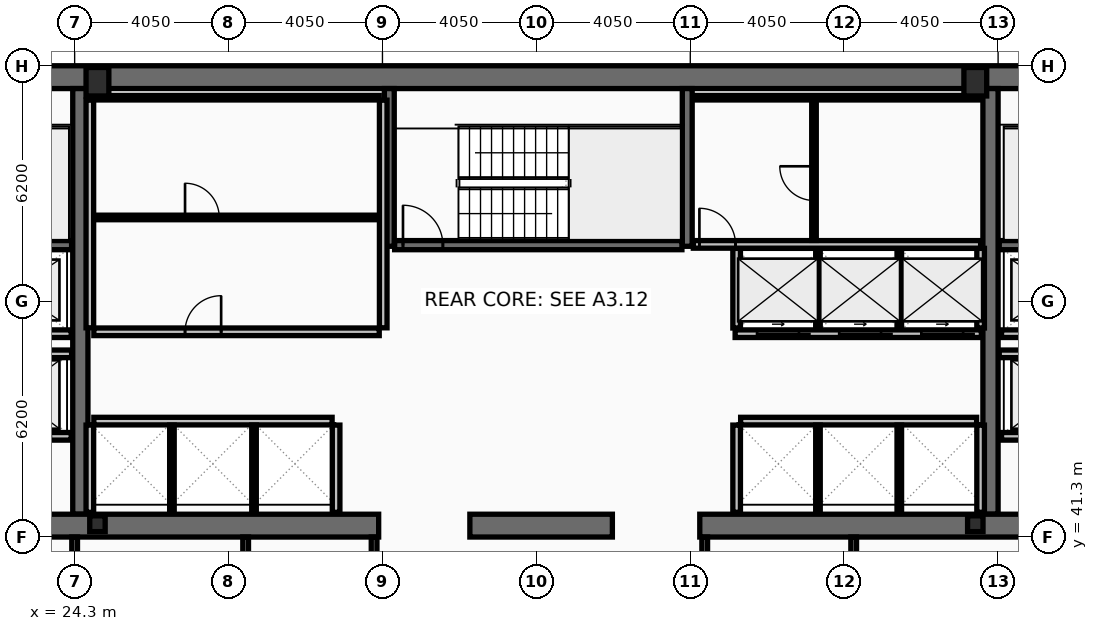
"""IFC4 building model, lengths in metres.
Left out: names, types, materials, properties, quantities, classifications, styles, units other than length and angle.
Written with IfcOpenShell. Run it as: python <this file> out.ifc"""

import sys

from ifc_helpers import new_model, si_unit, direction, frame, frame_2d, origin, origin_2d, place, context, subcontext, project, spatial, rectangle, hollow_rectangle, i_section, extrude, element, fill, save


model = new_model("IFC4")
c1 = context("Model", 3, precision=1e-05, world=origin(), true_north=direction((0.0, 1.0)))
c2 = subcontext(c1, "Body", "Model", "MODEL_VIEW")
j1 = project(units=[si_unit("LENGTHUNIT", "METRE"), si_unit("PLANEANGLEUNIT", "RADIAN")], contexts=[c1])
p1 = place(None, origin())
s1 = spatial("IfcSite", under=j1, at=p1, CompositionType="ELEMENT")
p2 = place(p1, origin())
s2 = spatial("IfcBuilding", under=s1, at=p2, CompositionType="ELEMENT")
p3 = place(p2, frame((0.0, 0.0, 188.6)))
s3 = spatial("IfcBuildingStorey", under=s2, at=p3, CompositionType="ELEMENT", Elevation=188.6)
p4 = place(p3, frame((16.2, 53.4, 0.0), z_axis=(0.0, 0.0, 1.0), x_axis=(1.0, 0.0, 0.0)))
e1 = element("IfcWall", 1, at=p4, inside=s3, PredefinedType="SHEAR", context=c2, shape_type="SweptSolid", body=[
    extrude(rectangle(XDim=40.5, YDim=0.6, at=frame_2d((20.25, 0.0))), origin(), (0.0, 0.0, 1.0), 3.44),
])
for number, where, z_axis, x_axis in (
    (2, (24.45, 41.9, 0.0), (0.0, 0.0, 1.0), (0.0, 1.0, 0.0)),
    (3, (48.4, 41.9, 0.0), (0.0, 0.0, 1.0), (0.0, 1.0, 0.0)),
):
    element("IfcWall", number, at=place(p3, frame(where, z_axis=z_axis, x_axis=x_axis)), inside=s3, PredefinedType="SHEAR", context=c2, shape_type="SweptSolid", body=[
        extrude(rectangle(XDim=11.2, YDim=0.4, at=frame_2d((5.6, 0.0))), origin(), (0.0, 0.0, 1.0), 3.44),
    ])
p5 = place(p3, frame((32.3, 41.6, 0.0), z_axis=(0.0, 0.0, 1.0), x_axis=(-1.0, 0.0, 0.0)))
e4 = element("IfcWall", 4, at=p5, inside=s3, PredefinedType="SHEAR", context=c2, shape_type="SweptSolid", body=[
    extrude(rectangle(XDim=11.45, YDim=0.6, at=frame_2d((5.725, 0.0))), origin(), (0.0, 0.0, 1.0), 3.44),
])
p6 = place(p3, frame((38.45, 41.6, 0.0), z_axis=(0.0, 0.0, 1.0), x_axis=(-1.0, 0.0, 0.0)))
e5 = element("IfcWall", 5, at=p6, inside=s3, PredefinedType="SHEAR", context=c2, shape_type="SweptSolid", body=[
    extrude(rectangle(XDim=3.75, YDim=0.6, at=frame_2d((1.875, 0.0))), origin(), (0.0, 0.0, 1.0), 3.44),
])
p7 = place(p3, frame((52.05, 41.6, 0.0), z_axis=(0.0, 0.0, 1.0), x_axis=(-1.0, 0.0, 0.0)))
e6 = element("IfcWall", 6, at=p7, inside=s3, PredefinedType="SHEAR", context=c2, shape_type="SweptSolid", body=[
    extrude(rectangle(XDim=11.3, YDim=0.6, at=frame_2d((5.65, 0.0))), origin(), (0.0, 0.0, 1.0), 3.44),
])
for number, where, z_axis, x_axis in (
    (7, (32.58, 48.95, 0.0), (0.0, 0.0, 1.0), (0.0, 1.0, 0.0)),
    (8, (40.42, 48.95, 0.0), (0.0, 0.0, 1.0), (0.0, 1.0, 0.0)),
):
    element("IfcWall", number, at=place(p3, frame(where, z_axis=z_axis, x_axis=x_axis)), inside=s3, PredefinedType="SHEAR", context=c2, shape_type="SweptSolid", body=[
        extrude(rectangle(XDim=4.15, YDim=0.26, at=frame_2d((2.075, 0.0))), origin(), (0.0, 0.0, 1.0), 3.44),
    ])
p8 = place(p3, frame((16.8, 48.98, 0.0), z_axis=(0.0, 0.0, 1.0), x_axis=(1.0, 0.0, 0.0)))
e9 = element("IfcWall", 9, at=p8, inside=s3, PredefinedType="SHEAR", context=c2, shape_type="SweptSolid", body=[
    extrude(rectangle(XDim=7.42, YDim=0.24, at=frame_2d((3.71, 0.0))), origin(), (0.0, 0.0, 1.0), 3.44),
])
p9 = place(p8, frame((0.22, 0.0, 0.0)))
e10 = element("IfcOpeningElement", 10, at=p9, cuts=e9, PredefinedType="OPENING", context=c2, shape_type="SweptSolid", body=[
    extrude(rectangle(XDim=1.05, YDim=2.15, at=frame_2d((0.525, 1.075))), frame((0.0, 0.13, 0.0), z_axis=(0.0, -1.0, 0.0), x_axis=(1.0, 0.0, 0.0)), (0.0, 0.0, 1.0), 0.26),
])
p10 = place(p3, frame((48.63, 48.98, 0.0), z_axis=(0.0, 0.0, 1.0), x_axis=(1.0, 0.0, 0.0)))
e11 = element("IfcWall", 11, at=p10, inside=s3, PredefinedType="SHEAR", context=c2, shape_type="SweptSolid", body=[
    extrude(rectangle(XDim=7.47, YDim=0.24, at=frame_2d((3.735, 0.0))), origin(), (0.0, 0.0, 1.0), 3.44),
])
p11 = place(p10, frame((6.2, 0.0, 0.0)))
e12 = element("IfcOpeningElement", 12, at=p11, cuts=e11, PredefinedType="OPENING", context=c2, shape_type="SweptSolid", body=[
    extrude(rectangle(XDim=1.05, YDim=2.15, at=frame_2d((0.525, 1.075))), frame((0.0, 0.13, 0.0), z_axis=(0.0, -1.0, 0.0), x_axis=(1.0, 0.0, 0.0)), (0.0, 0.0, 1.0), 0.26),
])
p12 = place(p3, frame((32.72, 48.98, 0.0), z_axis=(0.0, 0.0, 1.0), x_axis=(1.0, 0.0, 0.0)))
e13 = element("IfcWall", 13, at=p12, inside=s3, PredefinedType="SHEAR", context=c2, shape_type="SweptSolid", body=[
    extrude(rectangle(XDim=7.56, YDim=0.24, at=frame_2d((3.78, 0.0))), origin(), (0.0, 0.0, 1.0), 3.44),
])
p13 = place(p12, frame((0.22, 0.0, 0.0)))
e14 = element("IfcOpeningElement", 14, at=p13, cuts=e13, PredefinedType="OPENING", context=c2, shape_type="SweptSolid", body=[
    extrude(rectangle(XDim=1.05, YDim=2.15, at=frame_2d((0.525, 1.075))), frame((0.0, 0.13, 0.0), z_axis=(0.0, -1.0, 0.0), x_axis=(1.0, 0.0, 0.0)), (0.0, 0.0, 1.0), 0.26),
])
for number, where, z_axis, x_axis in (
    (15, (24.9, 53.28, 0.0), (0.0, 0.0, 1.0), (1.0, 0.0, 0.0)),
    (16, (48.0, 53.28, 0.0), (0.0, 0.0, 1.0), (1.0, 0.0, 0.0)),
):
    element("IfcColumn", number, at=place(p3, frame(where, z_axis=z_axis, x_axis=x_axis)), inside=s3, PredefinedType="COLUMN", context=c2, shape_type="SweptSolid", body=[
        extrude(hollow_rectangle(XDim=0.6, YDim=0.75, WallThickness=0.045, at=origin_2d()), origin(), (0.0, 0.0, 1.0), 3.6),
    ])
for number, where, z_axis, x_axis in (
    (17, (24.9, 41.65, 0.0), (0.0, 0.0, 1.0), (1.0, 0.0, 0.0)),
    (18, (48.0, 41.65, 0.0), (0.0, 0.0, 1.0), (1.0, 0.0, 0.0)),
):
    element("IfcColumn", number, at=place(p3, frame(where, z_axis=z_axis, x_axis=x_axis)), inside=s3, PredefinedType="COLUMN", context=c2, shape_type="SweptSolid", body=[
        extrude(i_section(OverallWidth=0.406, OverallDepth=0.416, WebThickness=0.03, FlangeThickness=0.048, at=origin_2d()), origin(), (0.0, 0.0, 1.0), 3.6),
    ])
p14 = place(p3, frame((51.61, 43.95, 0.0), z_axis=(0.0, 0.0, 1.0), x_axis=(-1.0, 0.0, 0.0)))
e19 = element("IfcWall", 19, at=p14, inside=s3, PredefinedType="PARTITIONING", context=c2, shape_type="SweptSolid", body=[
    extrude(rectangle(XDim=2.92, YDim=0.2, at=frame_2d((1.46, 0.0))), origin(), (0.0, 0.0, 1.0), 3.44),
])
p15 = place(p14, frame((0.81, 0.0, 0.0)))
e20 = element("IfcOpeningElement", 20, at=p15, cuts=e19, PredefinedType="OPENING", context=c2, shape_type="SweptSolid", body=[
    extrude(rectangle(XDim=1.3, YDim=2.18, at=frame_2d((0.65, 1.09))), frame((0.0, 0.11, 0.0), z_axis=(0.0, -1.0, 0.0), x_axis=(1.0, 0.0, 0.0)), (0.0, 0.0, 1.0), 0.22),
])
p16 = place(p3, frame((24.21, 43.95, 0.0), z_axis=(0.0, 0.0, 1.0), x_axis=(-1.0, 0.0, 0.0)))
e21 = element("IfcWall", 21, at=p16, inside=s3, PredefinedType="PARTITIONING", context=c2, shape_type="SweptSolid", body=[
    extrude(rectangle(XDim=2.97, YDim=0.2, at=frame_2d((1.485, 0.0))), origin(), (0.0, 0.0, 1.0), 3.44),
])
p17 = place(p16, frame((0.86, 0.0, 0.0)))
e22 = element("IfcOpeningElement", 22, at=p17, cuts=e21, PredefinedType="OPENING", context=c2, shape_type="SweptSolid", body=[
    extrude(rectangle(XDim=1.3, YDim=2.18, at=frame_2d((0.65, 1.09))), frame((0.0, 0.11, 0.0), z_axis=(0.0, -1.0, 0.0), x_axis=(1.0, 0.0, 0.0)), (0.0, 0.0, 1.0), 0.22),
])
p18 = place(p3, frame((51.61, 46.65, 0.0), z_axis=(0.0, 0.0, 1.0), x_axis=(-1.0, 0.0, 0.0)))
e23 = element("IfcWall", 23, at=p18, inside=s3, PredefinedType="PARTITIONING", context=c2, shape_type="SweptSolid", body=[
    extrude(rectangle(XDim=2.92, YDim=0.2, at=frame_2d((1.46, 0.0))), origin(), (0.0, 0.0, 1.0), 3.44),
])
p19 = place(p18, frame((0.86, 0.0, 0.0)))
e24 = element("IfcOpeningElement", 24, at=p19, cuts=e23, PredefinedType="OPENING", context=c2, shape_type="SweptSolid", body=[
    extrude(rectangle(XDim=1.2, YDim=2.18, at=frame_2d((0.6, 1.09))), frame((0.0, 0.11, 0.0), z_axis=(0.0, -1.0, 0.0), x_axis=(1.0, 0.0, 0.0)), (0.0, 0.0, 1.0), 0.22),
])
p20 = place(p3, frame((24.21, 46.65, 0.0), z_axis=(0.0, 0.0, 1.0), x_axis=(-1.0, 0.0, 0.0)))
e25 = element("IfcWall", 25, at=p20, inside=s3, PredefinedType="PARTITIONING", context=c2, shape_type="SweptSolid", body=[
    extrude(rectangle(XDim=2.97, YDim=0.2, at=frame_2d((1.485, 0.0))), origin(), (0.0, 0.0, 1.0), 3.44),
])
p21 = place(p20, frame((0.91, 0.0, 0.0)))
e26 = element("IfcOpeningElement", 26, at=p21, cuts=e25, PredefinedType="OPENING", context=c2, shape_type="SweptSolid", body=[
    extrude(rectangle(XDim=1.2, YDim=2.18, at=frame_2d((0.6, 1.09))), frame((0.0, 0.11, 0.0), z_axis=(0.0, -1.0, 0.0), x_axis=(1.0, 0.0, 0.0)), (0.0, 0.0, 1.0), 0.22),
])
p22 = place(p3, frame((48.16, 46.65, 0.0), z_axis=(0.0, 0.0, 1.0), x_axis=(-1.0, 0.0, 0.0)))
e27 = element("IfcWall", 27, at=p22, inside=s3, PredefinedType="PARTITIONING", context=c2, shape_type="SweptSolid", body=[
    extrude(rectangle(XDim=6.48, YDim=0.2, at=frame_2d((3.24, 0.0))), origin(), (0.0, 0.0, 1.0), 3.44),
])
p23 = place(p22, frame((4.8, 0.0, 0.0)))
e28 = element("IfcOpeningElement", 28, at=p23, cuts=e27, PredefinedType="OPENING", context=c2, shape_type="SweptSolid", body=[
    extrude(rectangle(XDim=1.1, YDim=2.18, at=frame_2d((0.55, 1.09))), frame((0.0, 0.11, 0.0), z_axis=(0.0, -1.0, 0.0), x_axis=(1.0, 0.0, 0.0)), (0.0, 0.0, 1.0), 0.22),
])
p24 = place(p22, frame((2.64, 0.0, 0.0)))
e29 = element("IfcOpeningElement", 29, at=p24, cuts=e27, PredefinedType="OPENING", context=c2, shape_type="SweptSolid", body=[
    extrude(rectangle(XDim=1.1, YDim=2.18, at=frame_2d((0.55, 1.09))), frame((0.0, 0.11, 0.0), z_axis=(0.0, -1.0, 0.0), x_axis=(1.0, 0.0, 0.0)), (0.0, 0.0, 1.0), 0.22),
])
p25 = place(p22, frame((0.48, 0.0, 0.0)))
e30 = element("IfcOpeningElement", 30, at=p25, cuts=e27, PredefinedType="OPENING", context=c2, shape_type="SweptSolid", body=[
    extrude(rectangle(XDim=1.1, YDim=2.18, at=frame_2d((0.55, 1.09))), frame((0.0, 0.11, 0.0), z_axis=(0.0, -1.0, 0.0), x_axis=(1.0, 0.0, 0.0)), (0.0, 0.0, 1.0), 0.22),
])
p26 = place(p3, frame((21.2, 46.12, 0.0), z_axis=(0.0, 0.0, 1.0), x_axis=(1.0, 0.0, 0.0)))
e31 = element("IfcWall", 31, at=p26, inside=s3, PredefinedType="PARTITIONING", context=c2, shape_type="SweptSolid", body=[
    extrude(rectangle(XDim=3.02, YDim=0.2, at=frame_2d((1.51, 0.0))), origin(), (0.0, 0.0, 1.0), 3.44),
])
p27 = place(p3, frame((48.63, 46.12, 0.0), z_axis=(0.0, 0.0, 1.0), x_axis=(1.0, 0.0, 0.0)))
e32 = element("IfcWall", 32, at=p27, inside=s3, PredefinedType="PARTITIONING", context=c2, shape_type="SweptSolid", body=[
    extrude(rectangle(XDim=3.07, YDim=0.2, at=frame_2d((1.535, 0.0))), origin(), (0.0, 0.0, 1.0), 3.44),
])
for number, where, z_axis, x_axis in (
    (33, (24.7, 46.805, 0.0), (0.0, 0.0, 1.0), (0.0, 1.0, 0.0)),
    (34, (32.42, 46.805, 0.0), (0.0, 0.0, 1.0), (0.0, 1.0, 0.0)),
):
    element("IfcWall", number, at=place(p3, frame(where, z_axis=z_axis, x_axis=x_axis)), inside=s3, PredefinedType="PARTITIONING", context=c2, shape_type="SweptSolid", body=[
        extrude(rectangle(XDim=5.99, YDim=0.2, at=frame_2d((2.995, 0.0))), origin(), (0.0, 0.0, 1.0), 3.44),
    ])
p28 = place(p3, frame((24.805, 52.86, 0.0), z_axis=(0.0, 0.0, 1.0), x_axis=(1.0, 0.0, 0.0)))
e35 = element("IfcWall", 35, at=p28, inside=s3, PredefinedType="PARTITIONING", context=c2, shape_type="SweptSolid", body=[
    extrude(rectangle(XDim=7.51, YDim=0.12, at=frame_2d((3.755, 0.0))), origin(), (0.0, 0.0, 1.0), 3.44),
])
p29 = place(p3, frame((24.805, 49.709, 0.0), z_axis=(0.0, 0.0, 1.0), x_axis=(1.0, 0.0, 0.0)))
e36 = element("IfcWall", 36, at=p29, inside=s3, PredefinedType="PARTITIONING", context=c2, shape_type="SweptSolid", body=[
    extrude(rectangle(XDim=7.51, YDim=0.12, at=frame_2d((3.755, 0.0))), origin(), (0.0, 0.0, 1.0), 3.44),
])
p30 = place(p29, frame((2.4, 0.0, 0.0)))
e37 = element("IfcOpeningElement", 37, at=p30, cuts=e36, PredefinedType="OPENING", context=c2, shape_type="SweptSolid", body=[
    extrude(rectangle(XDim=0.9, YDim=2.05, at=frame_2d((0.45, 1.025))), frame((0.0, 0.07, 0.0), z_axis=(0.0, -1.0, 0.0), x_axis=(1.0, 0.0, 0.0)), (0.0, 0.0, 1.0), 0.14),
])
p31 = place(p3, frame((24.805, 46.7, 0.0), z_axis=(0.0, 0.0, 1.0), x_axis=(1.0, 0.0, 0.0)))
e38 = element("IfcWall", 38, at=p31, inside=s3, PredefinedType="PARTITIONING", context=c2, shape_type="SweptSolid", body=[
    extrude(rectangle(XDim=7.51, YDim=0.2, at=frame_2d((3.755, 0.0))), origin(), (0.0, 0.0, 1.0), 3.44),
])
p32 = place(p31, frame((2.4, 0.0, 0.0)))
e39 = element("IfcOpeningElement", 39, at=p32, cuts=e38, PredefinedType="OPENING", context=c2, shape_type="SweptSolid", body=[
    extrude(rectangle(XDim=0.95, YDim=2.1, at=frame_2d((0.475, 1.05))), frame((0.0, 0.11, 0.0), z_axis=(0.0, -1.0, 0.0), x_axis=(1.0, 0.0, 0.0)), (0.0, 0.0, 1.0), 0.22),
])
p33 = place(p3, frame((24.805, 44.35, 0.0), z_axis=(0.0, 0.0, 1.0), x_axis=(1.0, 0.0, 0.0)))
e40 = element("IfcWall", 40, at=p33, inside=s3, PredefinedType="PARTITIONING", context=c2, shape_type="SweptSolid", body=[
    extrude(rectangle(XDim=6.27, YDim=0.2, at=frame_2d((3.135, 0.0))), origin(), (0.0, 0.0, 1.0), 3.44),
])
for number, where, z_axis, x_axis in (
    (41, (24.7, 41.95, 0.0), (0.0, 0.0, 1.0), (0.0, 1.0, 0.0)),
    (42, (31.18, 41.95, 0.0), (0.0, 0.0, 1.0), (0.0, 1.0, 0.0)),
):
    element("IfcWall", number, at=place(p3, frame(where, z_axis=z_axis, x_axis=x_axis)), inside=s3, PredefinedType="PARTITIONING", context=c2, shape_type="SweptSolid", body=[
        extrude(rectangle(XDim=2.295, YDim=0.2, at=frame_2d((1.147, 0.0))), origin(), (0.0, 0.0, 1.0), 3.44),
    ])
for number, where, z_axis, x_axis in (
    (43, (26.86, 41.95, 0.0), (0.0, 0.0, 1.0), (0.0, 1.0, 0.0)),
    (44, (29.02, 41.95, 0.0), (0.0, 0.0, 1.0), (0.0, 1.0, 0.0)),
):
    element("IfcWall", number, at=place(p3, frame(where, z_axis=z_axis, x_axis=x_axis)), inside=s3, PredefinedType="PARTITIONING", context=c2, shape_type="SweptSolid", body=[
        extrude(rectangle(XDim=2.295, YDim=0.12, at=frame_2d((1.147, 0.0))), origin(), (0.0, 0.0, 1.0), 3.44),
    ])
for number, where, z_axis, x_axis in (
    (45, (41.72, 46.8, 0.0), (0.0, 0.0, 1.0), (0.0, 1.0, 0.0)),
    (46, (48.14, 46.8, 0.0), (0.0, 0.0, 1.0), (0.0, 1.0, 0.0)),
):
    element("IfcWall", number, at=place(p3, frame(where, z_axis=z_axis, x_axis=x_axis)), inside=s3, PredefinedType="PARTITIONING", context=c2, shape_type="SweptSolid", body=[
        extrude(rectangle(XDim=2.095, YDim=0.2, at=frame_2d((1.047, 0.0))), origin(), (0.0, 0.0, 1.0), 3.44),
    ])
for number, where, z_axis, x_axis in (
    (47, (43.86, 46.8, 0.0), (0.0, 0.0, 1.0), (0.0, 1.0, 0.0)),
    (48, (46.0, 46.8, 0.0), (0.0, 0.0, 1.0), (0.0, 1.0, 0.0)),
):
    element("IfcWall", number, at=place(p3, frame(where, z_axis=z_axis, x_axis=x_axis)), inside=s3, PredefinedType="PARTITIONING", context=c2, shape_type="SweptSolid", body=[
        extrude(rectangle(XDim=2.095, YDim=0.12, at=frame_2d((1.047, 0.0))), origin(), (0.0, 0.0, 1.0), 3.44),
    ])
p34 = place(p3, frame((41.825, 44.35, 0.0), z_axis=(0.0, 0.0, 1.0), x_axis=(1.0, 0.0, 0.0)))
e49 = element("IfcWall", 49, at=p34, inside=s3, PredefinedType="PARTITIONING", context=c2, shape_type="SweptSolid", body=[
    extrude(rectangle(XDim=6.21, YDim=0.2, at=frame_2d((3.105, 0.0))), origin(), (0.0, 0.0, 1.0), 3.44),
])
for number, where, z_axis, x_axis in (
    (50, (41.72, 41.95, 0.0), (0.0, 0.0, 1.0), (0.0, 1.0, 0.0)),
    (51, (48.14, 41.95, 0.0), (0.0, 0.0, 1.0), (0.0, 1.0, 0.0)),
):
    element("IfcWall", number, at=place(p3, frame(where, z_axis=z_axis, x_axis=x_axis)), inside=s3, PredefinedType="PARTITIONING", context=c2, shape_type="SweptSolid", body=[
        extrude(rectangle(XDim=2.295, YDim=0.2, at=frame_2d((1.147, 0.0))), origin(), (0.0, 0.0, 1.0), 3.44),
    ])
for number, where, z_axis, x_axis in (
    (52, (43.86, 41.95, 0.0), (0.0, 0.0, 1.0), (0.0, 1.0, 0.0)),
    (53, (46.0, 41.95, 0.0), (0.0, 0.0, 1.0), (0.0, 1.0, 0.0)),
):
    element("IfcWall", number, at=place(p3, frame(where, z_axis=z_axis, x_axis=x_axis)), inside=s3, PredefinedType="PARTITIONING", context=c2, shape_type="SweptSolid", body=[
        extrude(rectangle(XDim=2.295, YDim=0.12, at=frame_2d((1.147, 0.0))), origin(), (0.0, 0.0, 1.0), 3.44),
    ])
p35 = place(p3, frame((40.58, 52.86, 0.0), z_axis=(0.0, 0.0, 1.0), x_axis=(1.0, 0.0, 0.0)))
e54 = element("IfcWall", 54, at=p35, inside=s3, PredefinedType="PARTITIONING", context=c2, shape_type="SweptSolid", body=[
    extrude(rectangle(XDim=7.56, YDim=0.12, at=frame_2d((3.78, 0.0))), origin(), (0.0, 0.0, 1.0), 3.44),
])
p36 = place(p3, frame((40.58, 49.0, 0.0), z_axis=(0.0, 0.0, 1.0), x_axis=(1.0, 0.0, 0.0)))
e55 = element("IfcWall", 55, at=p36, inside=s3, PredefinedType="PARTITIONING", context=c2, shape_type="SweptSolid", body=[
    extrude(rectangle(XDim=7.56, YDim=0.2, at=frame_2d((3.78, 0.0))), origin(), (0.0, 0.0, 1.0), 3.44),
])
p37 = place(p36, frame((0.16, 0.0, 0.0)))
e56 = element("IfcOpeningElement", 56, at=p37, cuts=e55, PredefinedType="OPENING", context=c2, shape_type="SweptSolid", body=[
    extrude(rectangle(XDim=0.95, YDim=2.1, at=frame_2d((0.475, 1.05))), frame((0.0, 0.11, 0.0), z_axis=(0.0, -1.0, 0.0), x_axis=(1.0, 0.0, 0.0)), (0.0, 0.0, 1.0), 0.22),
])
p38 = place(p3, frame((43.755, 49.105, 0.0), z_axis=(0.0, 0.0, 1.0), x_axis=(0.0, 1.0, 0.0)))
e57 = element("IfcWall", 57, at=p38, inside=s3, PredefinedType="PARTITIONING", context=c2, shape_type="SweptSolid", body=[
    extrude(rectangle(XDim=3.69, YDim=0.12, at=frame_2d((1.845, 0.0))), origin(), (0.0, 0.0, 1.0), 3.44),
])
p39 = place(p38, frame((1.05, 0.0, 0.0)))
e58 = element("IfcOpeningElement", 58, at=p39, cuts=e57, PredefinedType="OPENING", context=c2, shape_type="SweptSolid", body=[
    extrude(rectangle(XDim=0.9, YDim=2.05, at=frame_2d((0.45, 1.025))), frame((0.0, 0.07, 0.0), z_axis=(0.0, -1.0, 0.0), x_axis=(1.0, 0.0, 0.0)), (0.0, 0.0, 1.0), 0.14),
])
for number, where, z_axis, x_axis in (
    (59, (24.3, 38.28, 0.0), (0.0, 0.0, 1.0), (0.0, 1.0, 0.0)),
    (60, (28.8, 38.28, 0.0), (0.0, 0.0, 1.0), (0.0, 1.0, 0.0)),
    (61, (32.18, 38.28, 0.0), (0.0, 0.0, 1.0), (0.0, 1.0, 0.0)),
    (62, (40.88, 38.28, 0.0), (0.0, 0.0, 1.0), (0.0, 1.0, 0.0)),
    (63, (44.8, 38.28, 0.0), (0.0, 0.0, 1.0), (0.0, 1.0, 0.0)),
):
    element("IfcWall", number, at=place(p3, frame(where, z_axis=z_axis, x_axis=x_axis)), inside=s3, PredefinedType="PARTITIONING", context=c2, shape_type="SweptSolid", body=[
        extrude(rectangle(XDim=3.02, YDim=0.15, at=frame_2d((1.51, 0.0))), origin(), (0.0, 0.0, 1.0), 3.44),
    ])
p40 = place(p13, origin())
e64 = element("IfcDoor", 64, at=p40, inside=s3, OperationType="SINGLE_SWING_LEFT", PredefinedType="DOOR", context=c2, shape_type="SweptSolid", body=[
    extrude(rectangle(XDim=1.05, YDim=2.15, at=frame_2d((0.525, 1.075))), frame((0.0, 0.025, 0.0), z_axis=(0.0, -1.0, 0.0), x_axis=(1.0, 0.0, 0.0)), (0.0, 0.0, 1.0), 0.05),
])
fill(e14, e64)
p41 = place(p23, origin())
e65 = element("IfcDoor", 65, at=p41, inside=s3, OperationType="SLIDING_TO_LEFT", PredefinedType="DOOR", context=c2, shape_type="SweptSolid", body=[
    extrude(rectangle(XDim=1.1, YDim=2.18, at=frame_2d((0.55, 1.09))), frame((0.0, 0.025, 0.0), z_axis=(0.0, -1.0, 0.0), x_axis=(1.0, 0.0, 0.0)), (0.0, 0.0, 1.0), 0.05),
])
fill(e28, e65)
p42 = place(p24, origin())
e66 = element("IfcDoor", 66, at=p42, inside=s3, OperationType="SLIDING_TO_LEFT", PredefinedType="DOOR", context=c2, shape_type="SweptSolid", body=[
    extrude(rectangle(XDim=1.1, YDim=2.18, at=frame_2d((0.55, 1.09))), frame((0.0, 0.025, 0.0), z_axis=(0.0, -1.0, 0.0), x_axis=(1.0, 0.0, 0.0)), (0.0, 0.0, 1.0), 0.05),
])
fill(e29, e66)
p43 = place(p25, origin())
e67 = element("IfcDoor", 67, at=p43, inside=s3, OperationType="SLIDING_TO_LEFT", PredefinedType="DOOR", context=c2, shape_type="SweptSolid", body=[
    extrude(rectangle(XDim=1.1, YDim=2.18, at=frame_2d((0.55, 1.09))), frame((0.0, 0.025, 0.0), z_axis=(0.0, -1.0, 0.0), x_axis=(1.0, 0.0, 0.0)), (0.0, 0.0, 1.0), 0.05),
])
fill(e30, e67)
p44 = place(p30, origin())
e68 = element("IfcDoor", 68, at=p44, inside=s3, OperationType="SINGLE_SWING_LEFT", PredefinedType="DOOR", context=c2, shape_type="SweptSolid", body=[
    extrude(rectangle(XDim=0.9, YDim=2.05, at=frame_2d((0.45, 1.025))), frame((0.0, 0.025, 0.0), z_axis=(0.0, -1.0, 0.0), x_axis=(1.0, 0.0, 0.0)), (0.0, 0.0, 1.0), 0.05),
])
fill(e37, e68)
p45 = place(p32, origin())
e69 = element("IfcDoor", 69, at=p45, inside=s3, OperationType="SINGLE_SWING_RIGHT", PredefinedType="DOOR", context=c2, shape_type="SweptSolid", body=[
    extrude(rectangle(XDim=0.95, YDim=2.1, at=frame_2d((0.475, 1.05))), frame((0.0, 0.025, 0.0), z_axis=(0.0, -1.0, 0.0), x_axis=(1.0, 0.0, 0.0)), (0.0, 0.0, 1.0), 0.05),
])
fill(e39, e69)
p46 = place(p37, origin())
e70 = element("IfcDoor", 70, at=p46, inside=s3, OperationType="SINGLE_SWING_LEFT", PredefinedType="DOOR", context=c2, shape_type="SweptSolid", body=[
    extrude(rectangle(XDim=0.95, YDim=2.1, at=frame_2d((0.475, 1.05))), frame((0.0, 0.025, 0.0), z_axis=(0.0, -1.0, 0.0), x_axis=(1.0, 0.0, 0.0)), (0.0, 0.0, 1.0), 0.05),
])
fill(e56, e70)
p47 = place(p39, origin())
e71 = element("IfcDoor", 71, at=p47, inside=s3, OperationType="SINGLE_SWING_RIGHT", PredefinedType="DOOR", context=c2, shape_type="SweptSolid", body=[
    extrude(rectangle(XDim=0.9, YDim=2.05, at=frame_2d((0.45, 1.025))), frame((0.0, 0.025, 0.0), z_axis=(0.0, -1.0, 0.0), x_axis=(1.0, 0.0, 0.0)), (0.0, 0.0, 1.0), 0.05),
])
fill(e58, e71)
save(model, sys.argv[1])
